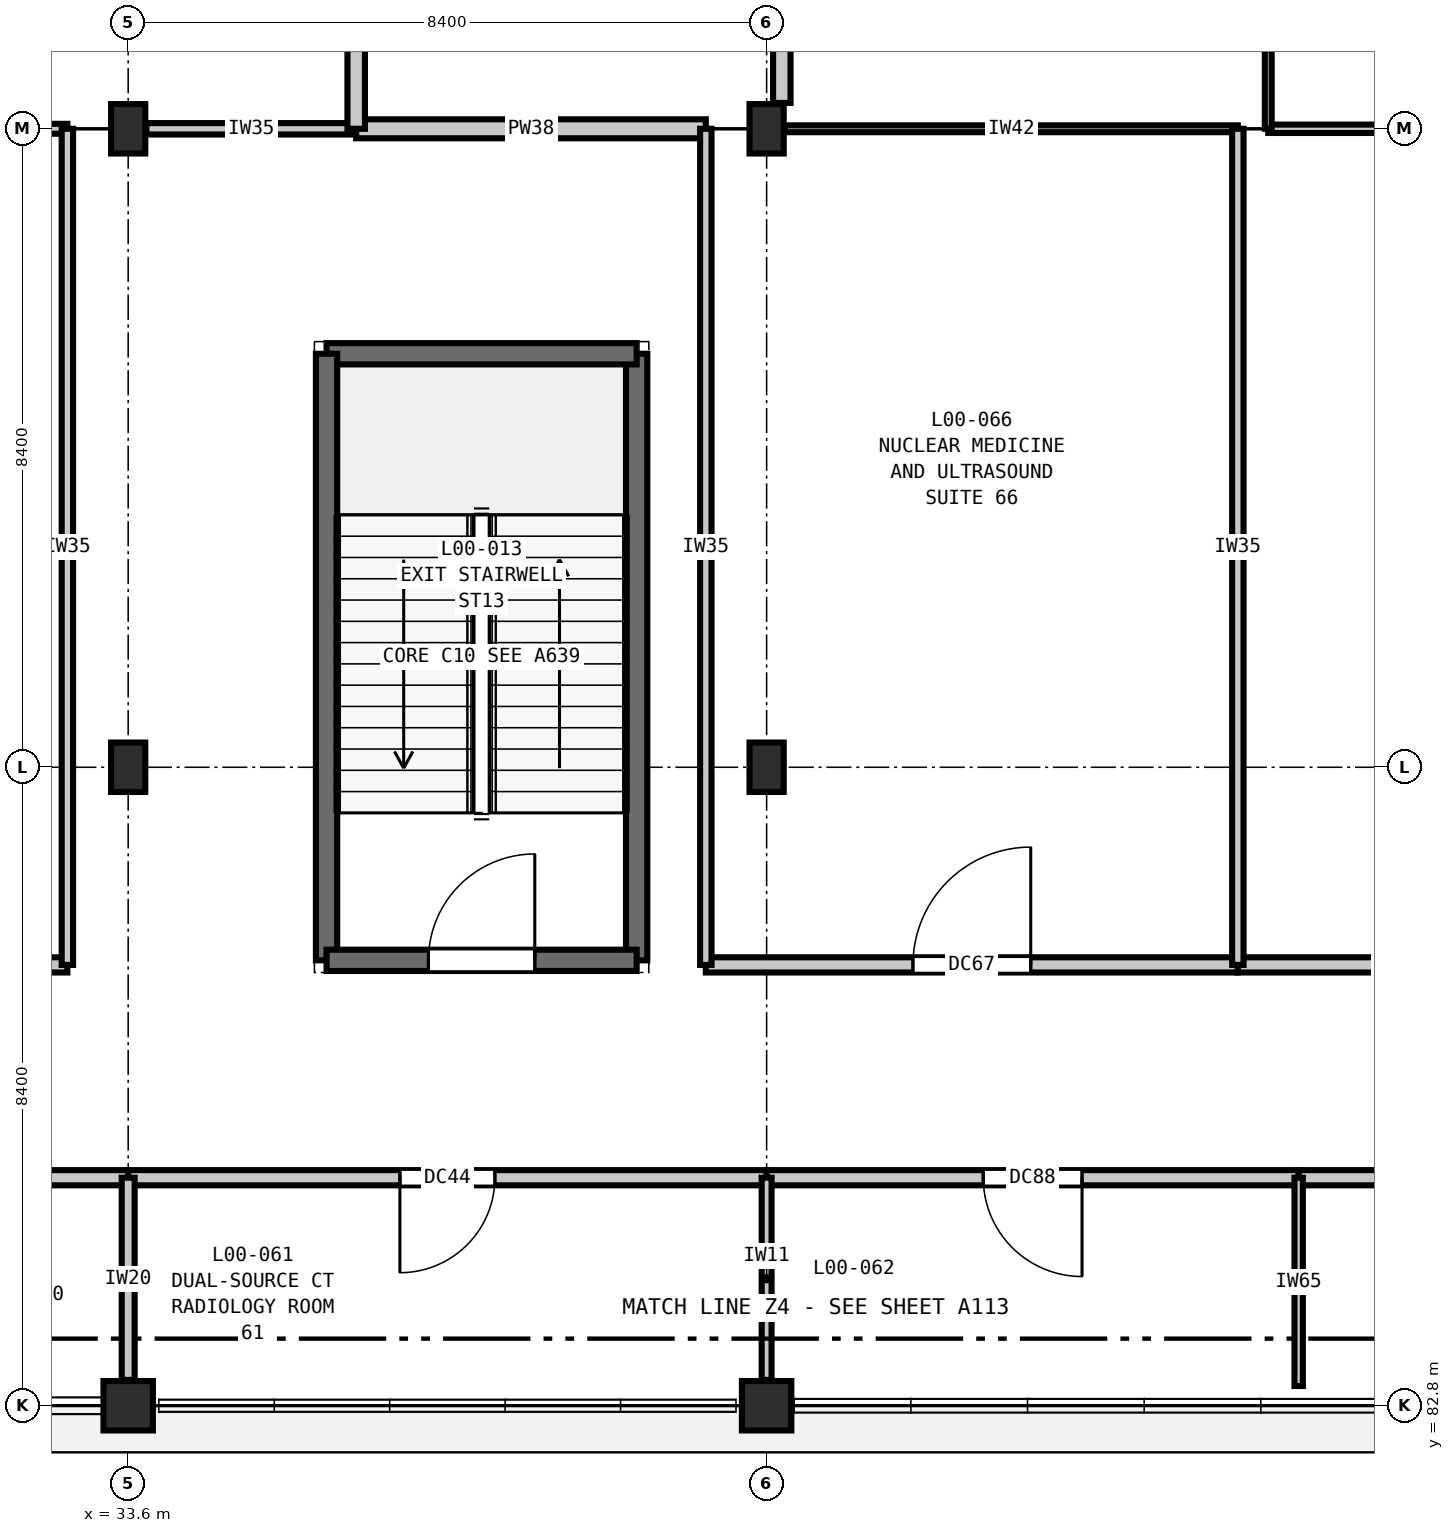
"""IFC4 building model, lengths in metres.
Left out: names, types, materials, properties, quantities, classifications, styles, units other than length and angle.
Written with IfcOpenShell. Run it as: python <this file> out.ifc"""

import sys

from ifc_helpers import new_model, si_unit, direction, frame, frame_2d, origin, origin_2d, place, context, subcontext, project, spatial, rectangle, extrude, element, fill, save


model = new_model("IFC4")
c1 = context("Model", 3, precision=1e-05, world=origin(), true_north=direction((0.0, 1.0)))
c2 = subcontext(c1, "Body", "Model", "MODEL_VIEW")
j1 = project(units=[si_unit("LENGTHUNIT", "METRE"), si_unit("PLANEANGLEUNIT", "RADIAN")], contexts=[c1])
p1 = place(None, origin())
s1 = spatial("IfcSite", under=j1, at=p1, CompositionType="ELEMENT")
p2 = place(p1, origin())
s2 = spatial("IfcBuilding", under=s1, at=p2, CompositionType="ELEMENT")
p3 = place(p2, origin())
s3 = spatial("IfcBuildingStorey", under=s2, at=p3, CompositionType="ELEMENT", Elevation=0.0)
p4 = place(p3, frame((33.6, 82.8, 0.0), z_axis=(0.0, 0.0, 1.0), x_axis=(1.0, 0.0, 0.0)))
e1 = element("IfcColumn", 1, at=p4, inside=s3, PredefinedType="COLUMN", context=c2, shape_type="SweptSolid", body=[
    extrude(rectangle(XDim=0.65, YDim=0.65, at=origin_2d()), origin(), (0.0, 0.0, 1.0), 5.4),
])
for number, where, z_axis, x_axis in (
    (2, (33.6, 91.2, 0.0), (0.0, 0.0, 1.0), (1.0, 0.0, 0.0)),
    (3, (33.6, 99.6, 0.0), (0.0, 0.0, 1.0), (1.0, 0.0, 0.0)),
):
    element("IfcColumn", number, at=place(p3, frame(where, z_axis=z_axis, x_axis=x_axis)), inside=s3, PredefinedType="COLUMN", context=c2, shape_type="SweptSolid", body=[
        extrude(rectangle(XDim=0.45, YDim=0.65, at=origin_2d()), origin(), (0.0, 0.0, 1.0), 5.4),
    ])
p5 = place(p3, frame((42.0, 82.8, 0.0), z_axis=(0.0, 0.0, 1.0), x_axis=(1.0, 0.0, 0.0)))
e4 = element("IfcColumn", 4, at=p5, inside=s3, PredefinedType="COLUMN", context=c2, shape_type="SweptSolid", body=[
    extrude(rectangle(XDim=0.65, YDim=0.65, at=origin_2d()), origin(), (0.0, 0.0, 1.0), 5.4),
])
for number, where, z_axis, x_axis in (
    (5, (42.0, 91.2, 0.0), (0.0, 0.0, 1.0), (1.0, 0.0, 0.0)),
    (6, (42.0, 99.6, 0.0), (0.0, 0.0, 1.0), (1.0, 0.0, 0.0)),
):
    element("IfcColumn", number, at=place(p3, frame(where, z_axis=z_axis, x_axis=x_axis)), inside=s3, PredefinedType="COLUMN", context=c2, shape_type="SweptSolid", body=[
        extrude(rectangle(XDim=0.45, YDim=0.65, at=origin_2d()), origin(), (0.0, 0.0, 1.0), 5.4),
    ])
p6 = place(p3, frame((40.29, 88.66, 0.0), z_axis=(0.0, 0.0, 1.0), x_axis=(0.0, 1.0, 0.0)))
e7 = element("IfcWall", 7, at=p6, inside=s3, PredefinedType="SHEAR", context=c2, shape_type="SweptSolid", body=[
    extrude(rectangle(XDim=7.98, YDim=0.28, at=frame_2d((3.99, 0.0))), origin(), (0.0, 0.0, 1.0), 5.4),
])
p7 = place(p3, frame((40.29, 96.64, 0.0), z_axis=(0.0, 0.0, 1.0), x_axis=(-1.0, 0.0, 0.0)))
e8 = element("IfcWall", 8, at=p7, inside=s3, PredefinedType="SHEAR", context=c2, shape_type="SweptSolid", body=[
    extrude(rectangle(XDim=4.08, YDim=0.28, at=frame_2d((2.04, 0.0))), origin(), (0.0, 0.0, 1.0), 5.4),
])
p8 = place(p3, frame((36.21, 96.64, 0.0), z_axis=(0.0, 0.0, 1.0), x_axis=(0.0, -1.0, 0.0)))
e9 = element("IfcWall", 9, at=p8, inside=s3, PredefinedType="SHEAR", context=c2, shape_type="SweptSolid", body=[
    extrude(rectangle(XDim=7.98, YDim=0.28, at=frame_2d((3.99, 0.0))), origin(), (0.0, 0.0, 1.0), 5.4),
])
p9 = place(p3, frame((36.21, 88.66, 0.0), z_axis=(0.0, 0.0, 1.0), x_axis=(1.0, 0.0, 0.0)))
e10 = element("IfcWall", 10, at=p9, inside=s3, PredefinedType="SHEAR", context=c2, shape_type="SweptSolid", body=[
    extrude(rectangle(XDim=4.08, YDim=0.28, at=frame_2d((2.04, 0.0))), origin(), (0.0, 0.0, 1.0), 5.4),
])
p10 = place(p9, frame((1.34, 0.0, 0.0)))
e11 = element("IfcOpeningElement", 11, at=p10, cuts=e10, PredefinedType="OPENING", context=c2, shape_type="SweptSolid", body=[
    extrude(rectangle(XDim=1.4, YDim=2.2, at=frame_2d((0.7, 1.1))), frame((0.0, 0.15, 0.0), z_axis=(0.0, -1.0, 0.0), x_axis=(1.0, 0.0, 0.0)), (0.0, 0.0, 1.0), 0.3),
])
p11 = place(p3, frame((25.2, 85.8, 0.0), z_axis=(0.0, 0.0, 1.0), x_axis=(1.0, 0.0, 0.0)))
e12 = element("IfcWall", 12, at=p11, inside=s3, PredefinedType="PARTITIONING", context=c2, shape_type="SweptSolid", body=[
    extrude(rectangle(XDim=8.4, YDim=0.2, at=frame_2d((4.2, 0.0))), origin(), (0.0, 0.0, 1.0), 5.04),
])
p12 = place(p11, frame((3.275, 0.0, 0.0)))
e13 = element("IfcOpeningElement", 13, at=p12, cuts=e12, PredefinedType="OPENING", context=c2, shape_type="SweptSolid", body=[
    extrude(rectangle(XDim=1.85, YDim=2.3, at=frame_2d((0.925, 1.15))), frame((0.0, 0.11, 0.0), z_axis=(0.0, -1.0, 0.0), x_axis=(1.0, 0.0, 0.0)), (0.0, 0.0, 1.0), 0.22),
])
p13 = place(p3, frame((33.6, 85.8, 0.0), z_axis=(0.0, 0.0, 1.0), x_axis=(1.0, 0.0, 0.0)))
e14 = element("IfcWall", 14, at=p13, inside=s3, PredefinedType="PARTITIONING", context=c2, shape_type="SweptSolid", body=[
    extrude(rectangle(XDim=8.4, YDim=0.2, at=frame_2d((4.2, 0.0))), origin(), (0.0, 0.0, 1.0), 5.04),
])
p14 = place(p13, frame((3.575, 0.0, 0.0)))
e15 = element("IfcOpeningElement", 15, at=p14, cuts=e14, PredefinedType="OPENING", context=c2, shape_type="SweptSolid", body=[
    extrude(rectangle(XDim=1.25, YDim=2.15, at=frame_2d((0.625, 1.075))), frame((0.0, 0.11, 0.0), z_axis=(0.0, -1.0, 0.0), x_axis=(1.0, 0.0, 0.0)), (0.0, 0.0, 1.0), 0.22),
])
p15 = place(p3, frame((42.0, 85.8, 0.0), z_axis=(0.0, 0.0, 1.0), x_axis=(1.0, 0.0, 0.0)))
e16 = element("IfcWall", 16, at=p15, inside=s3, PredefinedType="PARTITIONING", context=c2, shape_type="SweptSolid", body=[
    extrude(rectangle(XDim=7.0, YDim=0.2, at=frame_2d((3.5, 0.0))), origin(), (0.0, 0.0, 1.0), 5.04),
])
p16 = place(p15, frame((2.85, 0.0, 0.0)))
e17 = element("IfcOpeningElement", 17, at=p16, cuts=e16, PredefinedType="OPENING", context=c2, shape_type="SweptSolid", body=[
    extrude(rectangle(XDim=1.3, YDim=2.2, at=frame_2d((0.65, 1.1))), frame((0.0, 0.11, 0.0), z_axis=(0.0, -1.0, 0.0), x_axis=(1.0, 0.0, 0.0)), (0.0, 0.0, 1.0), 0.22),
])
p17 = place(p3, frame((49.0, 85.8, 0.0), z_axis=(0.0, 0.0, 1.0), x_axis=(1.0, 0.0, 0.0)))
e18 = element("IfcWall", 18, at=p17, inside=s3, PredefinedType="PARTITIONING", context=c2, shape_type="SweptSolid", body=[
    extrude(rectangle(XDim=9.8, YDim=0.2, at=frame_2d((4.9, 0.0))), origin(), (0.0, 0.0, 1.0), 5.04),
])
p18 = place(p17, frame((4.225, 0.0, 0.0)))
e19 = element("IfcOpeningElement", 19, at=p18, cuts=e18, PredefinedType="OPENING", context=c2, shape_type="SweptSolid", body=[
    extrude(rectangle(XDim=1.35, YDim=2.2, at=frame_2d((0.675, 1.1))), frame((0.0, 0.11, 0.0), z_axis=(0.0, -1.0, 0.0), x_axis=(1.0, 0.0, 0.0)), (0.0, 0.0, 1.0), 0.22),
])
p19 = place(p3, frame((24.4, 88.6, 0.0), z_axis=(0.0, 0.0, 1.0), x_axis=(1.0, 0.0, 0.0)))
e20 = element("IfcWall", 20, at=p19, inside=s3, PredefinedType="PARTITIONING", context=c2, shape_type="SweptSolid", body=[
    extrude(rectangle(XDim=8.4, YDim=0.2, at=frame_2d((4.2, 0.0))), origin(), (0.0, 0.0, 1.0), 5.04),
])
p20 = place(p19, frame((3.475, 0.0, 0.0)))
e21 = element("IfcOpeningElement", 21, at=p20, cuts=e20, PredefinedType="OPENING", context=c2, shape_type="SweptSolid", body=[
    extrude(rectangle(XDim=1.45, YDim=2.25, at=frame_2d((0.725, 1.125))), frame((0.0, 0.11, 0.0), z_axis=(0.0, -1.0, 0.0), x_axis=(1.0, 0.0, 0.0)), (0.0, 0.0, 1.0), 0.22),
])
p21 = place(p3, frame((41.2, 88.6, 0.0), z_axis=(0.0, 0.0, 1.0), x_axis=(1.0, 0.0, 0.0)))
e22 = element("IfcWall", 22, at=p21, inside=s3, PredefinedType="PARTITIONING", context=c2, shape_type="SweptSolid", body=[
    extrude(rectangle(XDim=7.0, YDim=0.2, at=frame_2d((3.5, 0.0))), origin(), (0.0, 0.0, 1.0), 5.04),
])
p22 = place(p21, frame((2.725, 0.0, 0.0)))
e23 = element("IfcOpeningElement", 23, at=p22, cuts=e22, PredefinedType="OPENING", context=c2, shape_type="SweptSolid", body=[
    extrude(rectangle(XDim=1.55, YDim=2.25, at=frame_2d((0.775, 1.125))), frame((0.0, 0.11, 0.0), z_axis=(0.0, -1.0, 0.0), x_axis=(1.0, 0.0, 0.0)), (0.0, 0.0, 1.0), 0.22),
])
p23 = place(p3, frame((48.2, 88.6, 0.0), z_axis=(0.0, 0.0, 1.0), x_axis=(1.0, 0.0, 0.0)))
e24 = element("IfcWall", 24, at=p23, inside=s3, PredefinedType="PARTITIONING", context=c2, shape_type="SweptSolid", body=[
    extrude(rectangle(XDim=10.6, YDim=0.2, at=frame_2d((5.3, 0.0))), origin(), (0.0, 0.0, 1.0), 5.04),
])
p24 = place(p23, frame((4.45, 0.0, 0.0)))
e25 = element("IfcOpeningElement", 25, at=p24, cuts=e24, PredefinedType="OPENING", context=c2, shape_type="SweptSolid", body=[
    extrude(rectangle(XDim=1.7, YDim=2.3, at=frame_2d((0.85, 1.15))), frame((0.0, 0.11, 0.0), z_axis=(0.0, -1.0, 0.0), x_axis=(1.0, 0.0, 0.0)), (0.0, 0.0, 1.0), 0.22),
])
p25 = place(p3, frame((28.2, 99.6, 0.0), z_axis=(0.0, 0.0, 1.0), x_axis=(1.0, 0.0, 0.0)))
e26 = element("IfcWall", 26, at=p25, inside=s3, PredefinedType="PARTITIONING", context=c2, shape_type="SweptSolid", body=[
    extrude(rectangle(XDim=4.6, YDim=0.13, at=frame_2d((2.3, 0.0))), origin(), (0.0, 0.0, 1.0), 4.635),
])
p26 = place(p3, frame((33.84, 99.6, 0.0), z_axis=(0.0, 0.0, 1.0), x_axis=(1.0, 0.0, 0.0)))
e27 = element("IfcWall", 27, at=p26, inside=s3, PredefinedType="PARTITIONING", context=c2, shape_type="SweptSolid", body=[
    extrude(rectangle(XDim=2.76, YDim=0.15, at=frame_2d((1.38, 0.0))), origin(), (0.0, 0.0, 1.0), 4.635),
])
p27 = place(p3, frame((36.6, 99.6, 0.0), z_axis=(0.0, 0.0, 1.0), x_axis=(1.0, 0.0, 0.0)))
e28 = element("IfcWall", 28, at=p27, inside=s3, PredefinedType="PARTITIONING", context=c2, shape_type="SweptSolid", body=[
    extrude(rectangle(XDim=4.6, YDim=0.25, at=frame_2d((2.3, 0.0))), origin(), (0.0, 0.0, 1.0), 4.635),
])
p28 = place(p3, frame((42.24, 99.6, 0.0), z_axis=(0.0, 0.0, 1.0), x_axis=(1.0, 0.0, 0.0)))
e29 = element("IfcWall", 29, at=p28, inside=s3, PredefinedType="PARTITIONING", context=c2, shape_type="SweptSolid", body=[
    extrude(rectangle(XDim=5.96, YDim=0.09, at=frame_2d((2.98, 0.0))), origin(), (0.0, 0.0, 1.0), 4.635),
])
p29 = place(p3, frame((48.6, 99.6, 0.0), z_axis=(0.0, 0.0, 1.0), x_axis=(1.0, 0.0, 0.0)))
e30 = element("IfcWall", 30, at=p29, inside=s3, PredefinedType="PARTITIONING", context=c2, shape_type="SweptSolid", body=[
    extrude(rectangle(XDim=1.56, YDim=0.11, at=frame_2d((0.78, 0.0))), origin(), (0.0, 0.0, 1.0), 4.635),
])
p30 = place(p3, frame((32.8, 88.6, 0.0), z_axis=(0.0, 0.0, 1.0), x_axis=(0.0, 1.0, 0.0)))
e31 = element("IfcWall", 31, at=p30, inside=s3, PredefinedType="PARTITIONING", context=c2, shape_type="SweptSolid", body=[
    extrude(rectangle(XDim=11.0, YDim=0.15, at=frame_2d((5.5, 0.0))), origin(), (0.0, 0.0, 1.0), 5.04),
])
p31 = place(p3, frame((33.6, 83.14, 0.0), z_axis=(0.0, 0.0, 1.0), x_axis=(0.0, 1.0, 0.0)))
e32 = element("IfcWall", 32, at=p31, inside=s3, PredefinedType="PARTITIONING", context=c2, shape_type="SweptSolid", body=[
    extrude(rectangle(XDim=2.66, YDim=0.17, at=frame_2d((1.33, 0.0))), origin(), (0.0, 0.0, 1.0), 4.685),
])
p32 = place(p3, frame((36.6, 99.6, 0.0), z_axis=(0.0, 0.0, 1.0), x_axis=(0.0, 1.0, 0.0)))
e33 = element("IfcWall", 33, at=p32, inside=s3, PredefinedType="PARTITIONING", context=c2, shape_type="SweptSolid", body=[
    extrude(rectangle(XDim=13.6, YDim=0.23, at=frame_2d((6.8, 0.0))), origin(), (0.0, 0.0, 1.0), 5.04),
])
p33 = place(p3, frame((41.2, 88.6, 0.0), z_axis=(0.0, 0.0, 1.0), x_axis=(0.0, 1.0, 0.0)))
e34 = element("IfcWall", 34, at=p33, inside=s3, PredefinedType="PARTITIONING", context=c2, shape_type="SweptSolid", body=[
    extrude(rectangle(XDim=11.0, YDim=0.15, at=frame_2d((5.5, 0.0))), origin(), (0.0, 0.0, 1.0), 5.04),
])
p34 = place(p3, frame((42.0, 83.14, 0.0), z_axis=(0.0, 0.0, 1.0), x_axis=(0.0, 1.0, 0.0)))
e35 = element("IfcWall", 35, at=p34, inside=s3, PredefinedType="PARTITIONING", context=c2, shape_type="SweptSolid", body=[
    extrude(rectangle(XDim=2.66, YDim=0.13, at=frame_2d((1.33, 0.0))), origin(), (0.0, 0.0, 1.0), 4.685),
])
p35 = place(p3, frame((42.2, 99.94, 0.0), z_axis=(0.0, 0.0, 1.0), x_axis=(0.0, 1.0, 0.0)))
e36 = element("IfcWall", 36, at=p35, inside=s3, PredefinedType="PARTITIONING", context=c2, shape_type="SweptSolid", body=[
    extrude(rectangle(XDim=2.495, YDim=0.23, at=frame_2d((1.248, 0.0))), origin(), (0.0, 0.0, 1.0), 4.685),
])
p36 = place(p3, frame((48.2, 88.6, 0.0), z_axis=(0.0, 0.0, 1.0), x_axis=(0.0, 1.0, 0.0)))
e37 = element("IfcWall", 37, at=p36, inside=s3, PredefinedType="PARTITIONING", context=c2, shape_type="SweptSolid", body=[
    extrude(rectangle(XDim=11.0, YDim=0.15, at=frame_2d((5.5, 0.0))), origin(), (0.0, 0.0, 1.0), 5.04),
])
p37 = place(p3, frame((48.6, 99.6, 0.0), z_axis=(0.0, 0.0, 1.0), x_axis=(0.0, 1.0, 0.0)))
e38 = element("IfcWall", 38, at=p37, inside=s3, PredefinedType="PARTITIONING", context=c2, shape_type="SweptSolid", body=[
    extrude(rectangle(XDim=13.6, YDim=0.09, at=frame_2d((6.8, 0.0))), origin(), (0.0, 0.0, 1.0), 5.04),
])
p38 = place(p3, frame((49.0, 83.06, 0.0), z_axis=(0.0, 0.0, 1.0), x_axis=(0.0, 1.0, 0.0)))
e39 = element("IfcWall", 39, at=p38, inside=s3, PredefinedType="PARTITIONING", context=c2, shape_type="SweptSolid", body=[
    extrude(rectangle(XDim=2.74, YDim=0.11, at=frame_2d((1.37, 0.0))), origin(), (0.0, 0.0, 1.0), 5.04),
])
p39 = place(p10, origin())
e40 = element("IfcDoor", 40, at=p39, inside=s3, OperationType="SINGLE_SWING_RIGHT", PredefinedType="DOOR", context=c2, shape_type="SweptSolid", body=[
    extrude(rectangle(XDim=1.4, YDim=2.2, at=frame_2d((0.7, 1.1))), frame((0.0, 0.025, 0.0), z_axis=(0.0, -1.0, 0.0), x_axis=(1.0, 0.0, 0.0)), (0.0, 0.0, 1.0), 0.05),
])
fill(e11, e40)
p40 = place(p14, frame((1.25, 0.0, 0.0), z_axis=(0.0, 0.0, 1.0), x_axis=(-1.0, 0.0, 0.0)))
e41 = element("IfcDoor", 41, at=p40, inside=s3, OperationType="SINGLE_SWING_RIGHT", PredefinedType="DOOR", context=c2, shape_type="SweptSolid", body=[
    extrude(rectangle(XDim=1.25, YDim=2.15, at=frame_2d((0.625, 1.075))), frame((0.0, 0.025, 0.0), z_axis=(0.0, -1.0, 0.0), x_axis=(1.0, 0.0, 0.0)), (0.0, 0.0, 1.0), 0.05),
])
fill(e15, e41)
p41 = place(p16, frame((1.3, 0.0, 0.0), z_axis=(0.0, 0.0, 1.0), x_axis=(-1.0, 0.0, 0.0)))
e42 = element("IfcDoor", 42, at=p41, inside=s3, OperationType="SINGLE_SWING_LEFT", PredefinedType="DOOR", context=c2, shape_type="SweptSolid", body=[
    extrude(rectangle(XDim=1.3, YDim=2.2, at=frame_2d((0.65, 1.1))), frame((0.0, 0.025, 0.0), z_axis=(0.0, -1.0, 0.0), x_axis=(1.0, 0.0, 0.0)), (0.0, 0.0, 1.0), 0.05),
])
fill(e17, e42)
p42 = place(p22, origin())
e43 = element("IfcDoor", 43, at=p42, inside=s3, OperationType="SINGLE_SWING_RIGHT", PredefinedType="DOOR", context=c2, shape_type="SweptSolid", body=[
    extrude(rectangle(XDim=1.55, YDim=2.25, at=frame_2d((0.775, 1.125))), frame((0.0, 0.025, 0.0), z_axis=(0.0, -1.0, 0.0), x_axis=(1.0, 0.0, 0.0)), (0.0, 0.0, 1.0), 0.05),
])
fill(e23, e43)
save(model, sys.argv[1])
